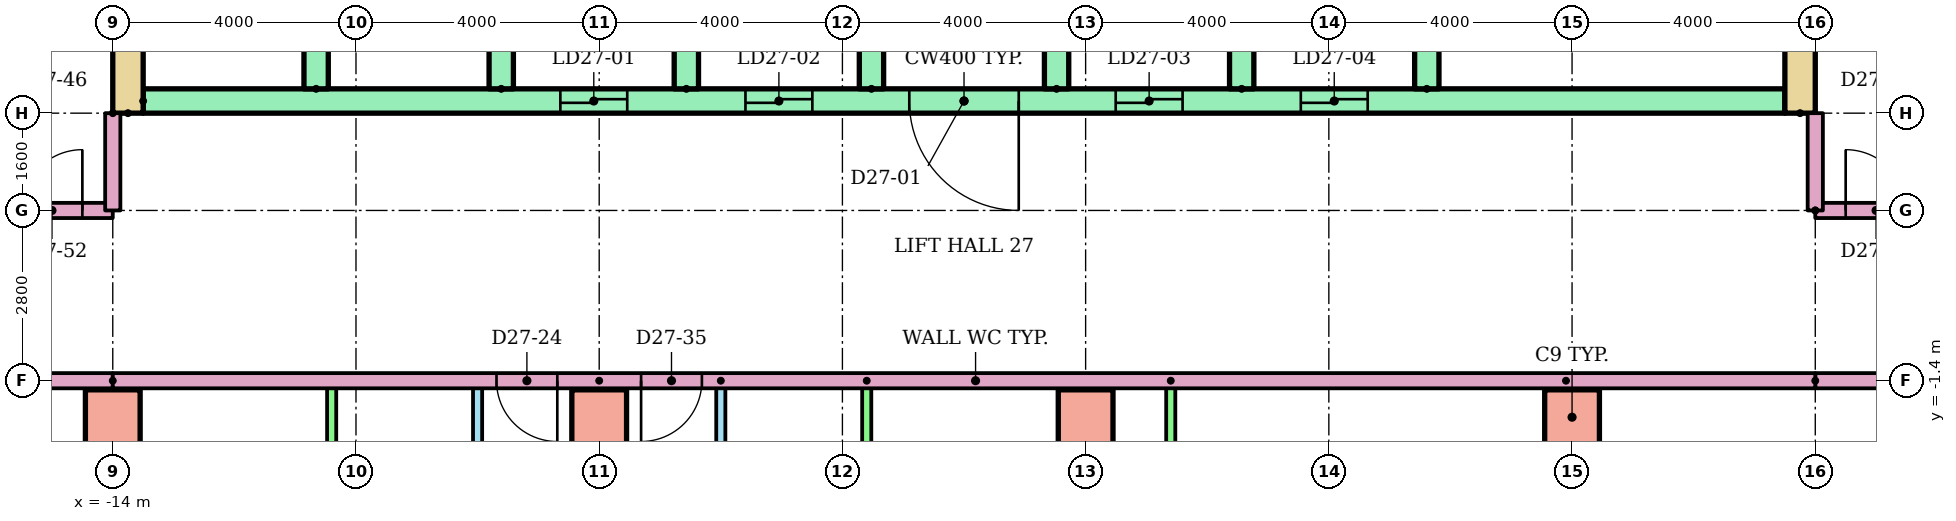
"""IFC4 building model, lengths in metres.
Left out: names, types, materials, properties, quantities, classifications, styles, units other than length and angle.
Written with IfcOpenShell. Run it as: python <this file> out.ifc"""

import sys

from ifc_helpers import new_model, si_unit, direction, frame, frame_2d, origin, origin_2d, place, context, subcontext, project, spatial, rectangle, extrude, element, fill, save


model = new_model("IFC4")
c1 = context("Model", 3, precision=1e-05, world=origin(), true_north=direction((0.0, 1.0)))
c2 = subcontext(c1, "Body", "Model", "MODEL_VIEW")
j1 = project(units=[si_unit("LENGTHUNIT", "METRE"), si_unit("PLANEANGLEUNIT", "RADIAN")], contexts=[c1])
p1 = place(None, origin())
s1 = spatial("IfcSite", under=j1, at=p1, CompositionType="ELEMENT")
p2 = place(p1, origin())
s2 = spatial("IfcBuilding", under=s1, at=p2, CompositionType="ELEMENT")
p3 = place(p2, frame((0.0, 0.0, 103.1)))
s3 = spatial("IfcBuildingStorey", under=s2, at=p3, CompositionType="ELEMENT", Elevation=103.1)
for number, where in (
    (1, (-14.0, -2.0, 0.0)),
    (2, (-6.0, -2.0, 0.0)),
    (3, (2.0, -2.0, 0.0)),
    (4, (10.0, -2.0, 0.0)),
):
    element("IfcColumn", number, at=place(p3, frame(where)), inside=s3, PredefinedType="COLUMN", context=c2, shape_type="SweptSolid", body=[
        extrude(rectangle(XDim=0.9, YDim=0.9, at=origin_2d()), origin(), (0.0, 0.0, 1.0), 3.2),
    ])
for number, where, z_axis, x_axis in (
    (5, (-13.75, 3.0, 0.0), (0.0, 0.0, 1.0), (0.0, 1.0, 0.0)),
    (6, (13.75, 3.0, 0.0), (0.0, 0.0, 1.0), (0.0, 1.0, 0.0)),
):
    element("IfcWall", number, at=place(p3, frame(where, z_axis=z_axis, x_axis=x_axis)), inside=s3, PredefinedType="SHEAR", context=c2, shape_type="SweptSolid", body=[
        extrude(rectangle(XDim=17.0, YDim=0.5, at=frame_2d((8.5, 0.0))), origin(), (0.0, 0.0, 1.0), 2.8),
    ])
p4 = place(p3, frame((-13.5, 3.2, 0.0)))
e7 = element("IfcWall", 7, at=p4, inside=s3, PredefinedType="SHEAR", context=c2, shape_type="SweptSolid", body=[
    extrude(rectangle(XDim=27.0, YDim=0.4, at=frame_2d((13.5, 0.0))), origin(), (0.0, 0.0, 1.0), 2.8),
])
p5 = place(p4, frame((6.861, 0.0, 0.0)))
e8 = element("IfcOpeningElement", 8, at=p5, cuts=e7, PredefinedType="OPENING", context=c2, shape_type="SweptSolid", body=[
    extrude(rectangle(XDim=1.1, YDim=2.1, at=frame_2d((0.55, 1.05))), frame((0.0, 0.21, 0.0), z_axis=(0.0, -1.0, 0.0), x_axis=(1.0, 0.0, 0.0)), (0.0, 0.0, 1.0), 0.42),
])
p6 = place(p4, frame((9.906, 0.0, 0.0)))
e9 = element("IfcOpeningElement", 9, at=p6, cuts=e7, PredefinedType="OPENING", context=c2, shape_type="SweptSolid", body=[
    extrude(rectangle(XDim=1.1, YDim=2.1, at=frame_2d((0.55, 1.05))), frame((0.0, 0.21, 0.0), z_axis=(0.0, -1.0, 0.0), x_axis=(1.0, 0.0, 0.0)), (0.0, 0.0, 1.0), 0.42),
])
p7 = place(p4, frame((15.994, 0.0, 0.0)))
e10 = element("IfcOpeningElement", 10, at=p7, cuts=e7, PredefinedType="OPENING", context=c2, shape_type="SweptSolid", body=[
    extrude(rectangle(XDim=1.1, YDim=2.1, at=frame_2d((0.55, 1.05))), frame((0.0, 0.21, 0.0), z_axis=(0.0, -1.0, 0.0), x_axis=(1.0, 0.0, 0.0)), (0.0, 0.0, 1.0), 0.42),
])
p8 = place(p4, frame((19.039, 0.0, 0.0)))
e11 = element("IfcOpeningElement", 11, at=p8, cuts=e7, PredefinedType="OPENING", context=c2, shape_type="SweptSolid", body=[
    extrude(rectangle(XDim=1.1, YDim=2.1, at=frame_2d((0.55, 1.05))), frame((0.0, 0.21, 0.0), z_axis=(0.0, -1.0, 0.0), x_axis=(1.0, 0.0, 0.0)), (0.0, 0.0, 1.0), 0.42),
])
p9 = place(p4, frame((12.6, 0.0, 0.0)))
e12 = element("IfcOpeningElement", 12, at=p9, cuts=e7, PredefinedType="OPENING", context=c2, shape_type="SweptSolid", body=[
    extrude(rectangle(XDim=1.8, YDim=2.1, at=frame_2d((0.9, 1.05))), frame((0.0, 0.21, 0.0), z_axis=(0.0, -1.0, 0.0), x_axis=(1.0, 0.0, 0.0)), (0.0, 0.0, 1.0), 0.42),
])
for number, where, z_axis, x_axis in (
    (13, (-10.656, 3.4, 0.0), (0.0, 0.0, 1.0), (0.0, 1.0, 0.0)),
    (14, (-7.611, 3.4, 0.0), (0.0, 0.0, 1.0), (0.0, 1.0, 0.0)),
    (15, (-4.567, 3.4, 0.0), (0.0, 0.0, 1.0), (0.0, 1.0, 0.0)),
    (16, (-1.522, 3.4, 0.0), (0.0, 0.0, 1.0), (0.0, 1.0, 0.0)),
    (17, (1.522, 3.4, 0.0), (0.0, 0.0, 1.0), (0.0, 1.0, 0.0)),
    (18, (4.567, 3.4, 0.0), (0.0, 0.0, 1.0), (0.0, 1.0, 0.0)),
    (19, (7.611, 3.4, 0.0), (0.0, 0.0, 1.0), (0.0, 1.0, 0.0)),
):
    element("IfcWall", number, at=place(p3, frame(where, z_axis=z_axis, x_axis=x_axis)), inside=s3, PredefinedType="SHEAR", context=c2, shape_type="SweptSolid", body=[
        extrude(rectangle(XDim=3.0, YDim=0.4, at=frame_2d((1.5, 0.0))), origin(), (0.0, 0.0, 1.0), 2.8),
    ])
p10 = place(p3, frame((-8.0, -6.7, 0.0), z_axis=(0.0, 0.0, 1.0), x_axis=(0.0, 1.0, 0.0)))
e20 = element("IfcWall", 20, at=p10, inside=s3, PredefinedType="PARTITIONING", context=c2, shape_type="SweptSolid", body=[
    extrude(rectangle(XDim=5.3, YDim=0.15, at=frame_2d((2.65, 0.0))), origin(), (0.0, 0.0, 1.0), 2.4),
])
p11 = place(p10, frame((3.35, 0.0, 0.0)))
e21 = element("IfcOpeningElement", 21, at=p11, cuts=e20, PredefinedType="OPENING", context=c2, shape_type="SweptSolid", body=[
    extrude(rectangle(XDim=0.9, YDim=2.1, at=frame_2d((0.45, 1.05))), frame((0.0, 0.085, 0.0), z_axis=(0.0, -1.0, 0.0), x_axis=(1.0, 0.0, 0.0)), (0.0, 0.0, 1.0), 0.17),
])
p12 = place(p10, frame((0.75, 0.0, 0.0)))
e22 = element("IfcOpeningElement", 22, at=p12, cuts=e20, PredefinedType="OPENING", context=c2, shape_type="SweptSolid", body=[
    extrude(rectangle(XDim=0.8, YDim=2.1, at=frame_2d((0.4, 1.05))), frame((0.0, 0.085, 0.0), z_axis=(0.0, -1.0, 0.0), x_axis=(1.0, 0.0, 0.0)), (0.0, 0.0, 1.0), 0.17),
])
p13 = place(p3, frame((-10.4, -6.7, 0.0), z_axis=(0.0, 0.0, 1.0), x_axis=(0.0, 1.0, 0.0)))
e23 = element("IfcWall", 23, at=p13, inside=s3, PredefinedType="PARTITIONING", context=c2, shape_type="SweptSolid", body=[
    extrude(rectangle(XDim=5.3, YDim=0.15, at=frame_2d((2.65, 0.0))), origin(), (0.0, 0.0, 1.0), 2.4),
])
p14 = place(p3, frame((-4.0, -1.4, 0.0), z_axis=(0.0, 0.0, 1.0), x_axis=(0.0, -1.0, 0.0)))
e24 = element("IfcWall", 24, at=p14, inside=s3, PredefinedType="PARTITIONING", context=c2, shape_type="SweptSolid", body=[
    extrude(rectangle(XDim=5.3, YDim=0.15, at=frame_2d((2.65, 0.0))), origin(), (0.0, 0.0, 1.0), 2.4),
])
p15 = place(p14, frame((1.05, 0.0, 0.0)))
e25 = element("IfcOpeningElement", 25, at=p15, cuts=e24, PredefinedType="OPENING", context=c2, shape_type="SweptSolid", body=[
    extrude(rectangle(XDim=0.9, YDim=2.1, at=frame_2d((0.45, 1.05))), frame((0.0, 0.085, 0.0), z_axis=(0.0, -1.0, 0.0), x_axis=(1.0, 0.0, 0.0)), (0.0, 0.0, 1.0), 0.17),
])
p16 = place(p14, frame((3.75, 0.0, 0.0)))
e26 = element("IfcOpeningElement", 26, at=p16, cuts=e24, PredefinedType="OPENING", context=c2, shape_type="SweptSolid", body=[
    extrude(rectangle(XDim=0.8, YDim=2.1, at=frame_2d((0.4, 1.05))), frame((0.0, 0.085, 0.0), z_axis=(0.0, -1.0, 0.0), x_axis=(1.0, 0.0, 0.0)), (0.0, 0.0, 1.0), 0.17),
])
for number, where, z_axis, x_axis in (
    (27, (-1.6, -1.4, 0.0), (0.0, 0.0, 1.0), (0.0, -1.0, 0.0)),
    (28, (3.4, -1.4, 0.0), (0.0, 0.0, 1.0), (0.0, -1.0, 0.0)),
    (29, (9.9, -1.4, 0.0), (0.0, 0.0, 1.0), (0.0, -1.0, 0.0)),
):
    element("IfcWall", number, at=place(p3, frame(where, z_axis=z_axis, x_axis=x_axis)), inside=s3, PredefinedType="PARTITIONING", context=c2, shape_type="SweptSolid", body=[
        extrude(rectangle(XDim=5.3, YDim=0.15, at=frame_2d((2.65, 0.0))), origin(), (0.0, 0.0, 1.0), 2.4),
    ])
p17 = place(p3, frame((-6.0, -1.4, 0.0), z_axis=(0.0, 0.0, 1.0), x_axis=(0.0, -1.0, 0.0)))
e30 = element("IfcWall", 30, at=p17, inside=s3, PredefinedType="PARTITIONING", context=c2, shape_type="SweptSolid", body=[
    extrude(rectangle(XDim=14.81, YDim=0.25, at=frame_2d((7.405, 0.0))), origin(), (0.0, 0.0, 1.0), 2.4),
])
p18 = place(p3, frame((-14.0, -1.4, 0.0), z_axis=(0.0, 0.0, 1.0), x_axis=(-1.0, 0.0, 0.0)))
e31 = element("IfcWall", 31, at=p18, inside=s3, PredefinedType="PARTITIONING", context=c2, shape_type="SweptSolid", body=[
    extrude(rectangle(XDim=14.62, YDim=0.25, at=frame_2d((7.31, 0.0))), origin(), (0.0, 0.0, 1.0), 2.4),
])
p19 = place(p3, frame((29.0, -1.4, 0.0), z_axis=(0.0, 0.0, 1.0), x_axis=(-1.0, 0.0, 0.0)))
e32 = element("IfcWall", 32, at=p19, inside=s3, PredefinedType="PARTITIONING", context=c2, shape_type="SweptSolid", body=[
    extrude(rectangle(XDim=15.0, YDim=0.25, at=frame_2d((7.5, 0.0))), origin(), (0.0, 0.0, 1.0), 2.4),
])
p20 = place(p19, frame((9.311, 0.0, 0.0)))
e33 = element("IfcOpeningElement", 33, at=p20, cuts=e32, PredefinedType="OPENING", context=c2, shape_type="SweptSolid", body=[
    extrude(rectangle(XDim=1.0, YDim=2.1, at=frame_2d((0.5, 1.05))), frame((0.0, 0.135, 0.0), z_axis=(0.0, -1.0, 0.0), x_axis=(1.0, 0.0, 0.0)), (0.0, 0.0, 1.0), 0.27),
])
p21 = place(p3, frame((-28.62, 1.4, 0.0)))
e34 = element("IfcWall", 34, at=p21, inside=s3, PredefinedType="PARTITIONING", context=c2, shape_type="SweptSolid", body=[
    extrude(rectangle(XDim=14.62, YDim=0.25, at=frame_2d((7.31, 0.0))), origin(), (0.0, 0.0, 1.0), 2.4),
])
p22 = place(p21, frame((13.12, 0.0, 0.0)))
e35 = element("IfcOpeningElement", 35, at=p22, cuts=e34, PredefinedType="OPENING", context=c2, shape_type="SweptSolid", body=[
    extrude(rectangle(XDim=1.0, YDim=2.1, at=frame_2d((0.5, 1.05))), frame((0.0, 0.135, 0.0), z_axis=(0.0, -1.0, 0.0), x_axis=(1.0, 0.0, 0.0)), (0.0, 0.0, 1.0), 0.27),
])
p23 = place(p3, frame((14.0, 1.4, 0.0)))
e36 = element("IfcWall", 36, at=p23, inside=s3, PredefinedType="PARTITIONING", context=c2, shape_type="SweptSolid", body=[
    extrude(rectangle(XDim=15.0, YDim=0.25, at=frame_2d((7.5, 0.0))), origin(), (0.0, 0.0, 1.0), 2.4),
])
p24 = place(p23, frame((0.5, 0.0, 0.0)))
e37 = element("IfcOpeningElement", 37, at=p24, cuts=e36, PredefinedType="OPENING", context=c2, shape_type="SweptSolid", body=[
    extrude(rectangle(XDim=1.0, YDim=2.1, at=frame_2d((0.5, 1.05))), frame((0.0, 0.135, 0.0), z_axis=(0.0, -1.0, 0.0), x_axis=(1.0, 0.0, 0.0)), (0.0, 0.0, 1.0), 0.27),
])
p25 = place(p23, frame((12.689, 0.0, 0.0)))
e38 = element("IfcOpeningElement", 38, at=p25, cuts=e36, PredefinedType="OPENING", context=c2, shape_type="SweptSolid", body=[
    extrude(rectangle(XDim=1.0, YDim=2.1, at=frame_2d((0.5, 1.05))), frame((0.0, 0.135, 0.0), z_axis=(0.0, -1.0, 0.0), x_axis=(1.0, 0.0, 0.0)), (0.0, 0.0, 1.0), 0.27),
])
p26 = place(p3, frame((14.0, -1.4, 0.0), z_axis=(0.0, 0.0, 1.0), x_axis=(-1.0, 0.0, 0.0)))
e39 = element("IfcWall", 39, at=p26, inside=s3, PredefinedType="PARTITIONING", context=c2, shape_type="SweptSolid", body=[
    extrude(rectangle(XDim=28.0, YDim=0.25, at=frame_2d((14.0, 0.0))), origin(), (0.0, 0.0, 1.0), 2.4),
])
p27 = place(p26, frame((20.689, 0.0, 0.0)))
e40 = element("IfcOpeningElement", 40, at=p27, cuts=e39, PredefinedType="OPENING", context=c2, shape_type="SweptSolid", body=[
    extrude(rectangle(XDim=1.0, YDim=2.1, at=frame_2d((0.5, 1.05))), frame((0.0, 0.135, 0.0), z_axis=(0.0, -1.0, 0.0), x_axis=(1.0, 0.0, 0.0)), (0.0, 0.0, 1.0), 0.27),
])
p28 = place(p26, frame((18.311, 0.0, 0.0)))
e41 = element("IfcOpeningElement", 41, at=p28, cuts=e39, PredefinedType="OPENING", context=c2, shape_type="SweptSolid", body=[
    extrude(rectangle(XDim=1.0, YDim=2.1, at=frame_2d((0.5, 1.05))), frame((0.0, 0.135, 0.0), z_axis=(0.0, -1.0, 0.0), x_axis=(1.0, 0.0, 0.0)), (0.0, 0.0, 1.0), 0.27),
])
for number, where, z_axis, x_axis in (
    (42, (-14.0, 3.0, 0.0), (0.0, 0.0, 1.0), (0.0, -1.0, 0.0)),
    (43, (14.0, 1.4, 0.0), (0.0, 0.0, 1.0), (0.0, 1.0, 0.0)),
):
    element("IfcWall", number, at=place(p3, frame(where, z_axis=z_axis, x_axis=x_axis)), inside=s3, PredefinedType="PARTITIONING", context=c2, shape_type="SweptSolid", body=[
        extrude(rectangle(XDim=1.6, YDim=0.25, at=frame_2d((0.8, 0.0))), origin(), (0.0, 0.0, 1.0), 2.4),
    ])
p29 = place(p5, origin())
e44 = element("IfcDoor", 44, at=p29, inside=s3, OperationType="SLIDING_TO_LEFT", PredefinedType="DOOR", context=c2, shape_type="SweptSolid", body=[
    extrude(rectangle(XDim=1.1, YDim=2.1, at=frame_2d((0.55, 1.05))), frame((0.0, 0.025, 0.0), z_axis=(0.0, -1.0, 0.0), x_axis=(1.0, 0.0, 0.0)), (0.0, 0.0, 1.0), 0.05),
])
fill(e8, e44)
p30 = place(p6, origin())
e45 = element("IfcDoor", 45, at=p30, inside=s3, OperationType="SLIDING_TO_LEFT", PredefinedType="DOOR", context=c2, shape_type="SweptSolid", body=[
    extrude(rectangle(XDim=1.1, YDim=2.1, at=frame_2d((0.55, 1.05))), frame((0.0, 0.025, 0.0), z_axis=(0.0, -1.0, 0.0), x_axis=(1.0, 0.0, 0.0)), (0.0, 0.0, 1.0), 0.05),
])
fill(e9, e45)
p31 = place(p7, origin())
e46 = element("IfcDoor", 46, at=p31, inside=s3, OperationType="SLIDING_TO_LEFT", PredefinedType="DOOR", context=c2, shape_type="SweptSolid", body=[
    extrude(rectangle(XDim=1.1, YDim=2.1, at=frame_2d((0.55, 1.05))), frame((0.0, 0.025, 0.0), z_axis=(0.0, -1.0, 0.0), x_axis=(1.0, 0.0, 0.0)), (0.0, 0.0, 1.0), 0.05),
])
fill(e10, e46)
p32 = place(p8, origin())
e47 = element("IfcDoor", 47, at=p32, inside=s3, OperationType="SLIDING_TO_LEFT", PredefinedType="DOOR", context=c2, shape_type="SweptSolid", body=[
    extrude(rectangle(XDim=1.1, YDim=2.1, at=frame_2d((0.55, 1.05))), frame((0.0, 0.025, 0.0), z_axis=(0.0, -1.0, 0.0), x_axis=(1.0, 0.0, 0.0)), (0.0, 0.0, 1.0), 0.05),
])
fill(e11, e47)
p33 = place(p9, frame((1.8, 0.0, 0.0), z_axis=(0.0, 0.0, 1.0), x_axis=(-1.0, 0.0, 0.0)))
e48 = element("IfcDoor", 48, at=p33, inside=s3, OperationType="DOUBLE_DOOR_SINGLE_SWING", PredefinedType="DOOR", context=c2, shape_type="SweptSolid", body=[
    extrude(rectangle(XDim=1.8, YDim=2.1, at=frame_2d((0.9, 1.05))), frame((0.0, 0.025, 0.0), z_axis=(0.0, -1.0, 0.0), x_axis=(1.0, 0.0, 0.0)), (0.0, 0.0, 1.0), 0.05),
])
fill(e12, e48)
p34 = place(p27, origin())
e49 = element("IfcDoor", 49, at=p34, inside=s3, OperationType="SINGLE_SWING_LEFT", PredefinedType="DOOR", context=c2, shape_type="SweptSolid", body=[
    extrude(rectangle(XDim=1.0, YDim=2.1, at=frame_2d((0.5, 1.05))), frame((0.0, 0.025, 0.0), z_axis=(0.0, -1.0, 0.0), x_axis=(1.0, 0.0, 0.0)), (0.0, 0.0, 1.0), 0.05),
])
fill(e40, e49)
p35 = place(p28, origin())
e50 = element("IfcDoor", 50, at=p35, inside=s3, OperationType="SINGLE_SWING_RIGHT", PredefinedType="DOOR", context=c2, shape_type="SweptSolid", body=[
    extrude(rectangle(XDim=1.0, YDim=2.1, at=frame_2d((0.5, 1.05))), frame((0.0, 0.025, 0.0), z_axis=(0.0, -1.0, 0.0), x_axis=(1.0, 0.0, 0.0)), (0.0, 0.0, 1.0), 0.05),
])
fill(e41, e50)
p36 = place(p22, origin())
e51 = element("IfcDoor", 51, at=p36, inside=s3, OperationType="SINGLE_SWING_RIGHT", PredefinedType="DOOR", context=c2, shape_type="SweptSolid", body=[
    extrude(rectangle(XDim=1.0, YDim=2.1, at=frame_2d((0.5, 1.05))), frame((0.0, 0.025, 0.0), z_axis=(0.0, -1.0, 0.0), x_axis=(1.0, 0.0, 0.0)), (0.0, 0.0, 1.0), 0.05),
])
fill(e35, e51)
p37 = place(p24, origin())
e52 = element("IfcDoor", 52, at=p37, inside=s3, OperationType="SINGLE_SWING_LEFT", PredefinedType="DOOR", context=c2, shape_type="SweptSolid", body=[
    extrude(rectangle(XDim=1.0, YDim=2.1, at=frame_2d((0.5, 1.05))), frame((0.0, 0.025, 0.0), z_axis=(0.0, -1.0, 0.0), x_axis=(1.0, 0.0, 0.0)), (0.0, 0.0, 1.0), 0.05),
])
fill(e37, e52)
save(model, sys.argv[1])
